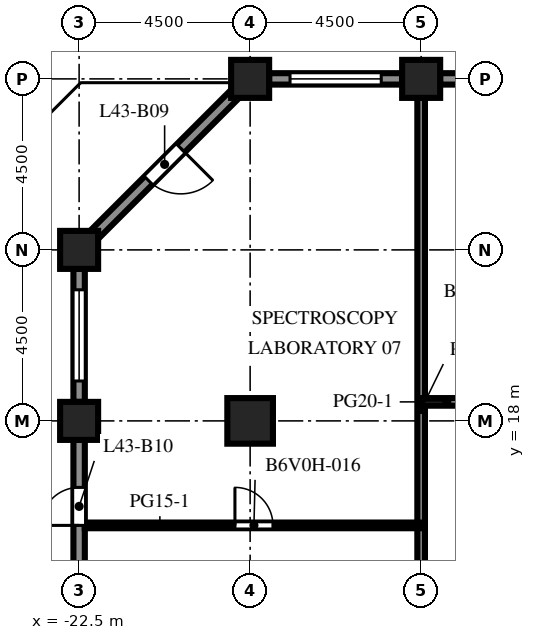
"""IFC4 building model, lengths in metres.
Left out: names, types, materials, properties, quantities, classifications, styles, units other than length and angle.
Written with IfcOpenShell. Run it as: python <this file> out.ifc"""

import sys

from ifc_helpers import new_model, si_unit, direction, frame, frame_2d, origin, origin_2d, place, context, subcontext, project, spatial, rectangle, extrude, element, fill, save


model = new_model("IFC4")
c1 = context("Model", 3, precision=1e-05, world=origin(), true_north=direction((0.0, 1.0)))
c2 = subcontext(c1, "Body", "Model", "MODEL_VIEW")
j1 = project(units=[si_unit("LENGTHUNIT", "METRE"), si_unit("PLANEANGLEUNIT", "RADIAN")], contexts=[c1])
p1 = place(None, origin())
s1 = spatial("IfcSite", under=j1, at=p1, CompositionType="ELEMENT")
p2 = place(p1, origin())
s2 = spatial("IfcBuilding", under=s1, at=p2, CompositionType="ELEMENT")
p3 = place(p2, frame((0.0, 0.0, 191.5)))
s3 = spatial("IfcBuildingStorey", under=s2, at=p3, CompositionType="ELEMENT", Elevation=191.5)
for number, where, z_axis, x_axis in (
    (1, (-22.5, 18.0, -0.45), (0.0, 0.0, 1.0), (1.0, 0.0, 0.0)),
    (2, (-22.5, 22.5, -0.45), (0.0, 0.0, 1.0), (1.0, 0.0, 0.0)),
):
    element("IfcColumn", number, at=place(p3, frame(where, z_axis=z_axis, x_axis=x_axis)), inside=s3, PredefinedType="COLUMN", context=c2, shape_type="SweptSolid", body=[
        extrude(rectangle(XDim=1.0, YDim=1.0, at=origin_2d()), origin(), (0.0, 0.0, 1.0), 4.55),
    ])
for number, where, z_axis, x_axis in (
    (3, (-18.0, 27.0, 0.0), (0.0, 0.0, 1.0), (1.0, 0.0, 0.0)),
    (4, (-13.5, 27.0, 0.0), (0.0, 0.0, 1.0), (1.0, 0.0, 0.0)),
):
    element("IfcColumn", number, at=place(p3, frame(where, z_axis=z_axis, x_axis=x_axis)), inside=s3, PredefinedType="COLUMN", context=c2, shape_type="SweptSolid", body=[
        extrude(rectangle(XDim=1.0, YDim=1.0, at=origin_2d()), origin(), (0.0, 0.0, 1.0), 4.1),
    ])
p4 = place(p3, frame((-18.0, 18.0, -0.45), z_axis=(0.0, 0.0, 1.0), x_axis=(1.0, 0.0, 0.0)))
e5 = element("IfcColumn", 5, at=p4, inside=s3, PredefinedType="COLUMN", context=c2, shape_type="SweptSolid", body=[
    extrude(rectangle(XDim=1.2, YDim=1.2, at=origin_2d()), origin(), (0.0, 0.0, 1.0), 4.55),
])
p5 = place(p3, frame((-13.0, 27.0, 0.0), z_axis=(0.0, 0.0, 1.0), x_axis=(1.0, 0.0, 0.0)))
e6 = element("IfcWall", 6, at=p5, inside=s3, PredefinedType="SOLIDWALL", context=c2, shape_type="SweptSolid", body=[
    extrude(rectangle(XDim=3.5, YDim=0.3, at=frame_2d((1.75, 0.0))), origin(), (0.0, 0.0, 1.0), 2.85),
])
p6 = place(p5, frame((1.25, 0.0, 0.0)))
e7 = element("IfcOpeningElement", 7, at=p6, cuts=e6, PredefinedType="OPENING", context=c2, shape_type="SweptSolid", body=[
    extrude(rectangle(XDim=1.0, YDim=2.2, at=frame_2d((0.5, 1.1))), frame((0.0, 0.16, 0.0), z_axis=(0.0, -1.0, 0.0), x_axis=(1.0, 0.0, 0.0)), (0.0, 0.0, 1.0), 0.32),
])
p7 = place(p3, frame((-17.5, 27.0, 0.0), z_axis=(0.0, 0.0, 1.0), x_axis=(1.0, 0.0, 0.0)))
e8 = element("IfcWall", 8, at=p7, inside=s3, PredefinedType="SOLIDWALL", context=c2, shape_type="SweptSolid", body=[
    extrude(rectangle(XDim=3.5, YDim=0.3, at=frame_2d((1.75, 0.0))), origin(), (0.0, 0.0, 1.0), 2.85),
])
p8 = place(p7, frame((0.55, 0.0, 0.8)))
e9 = element("IfcOpeningElement", 9, at=p8, cuts=e8, PredefinedType="OPENING", context=c2, shape_type="SweptSolid", body=[
    extrude(rectangle(XDim=2.4, YDim=1.7, at=frame_2d((1.2, 0.85))), frame((0.0, 0.16, 0.0), z_axis=(0.0, -1.0, 0.0), x_axis=(1.0, 0.0, 0.0)), (0.0, 0.0, 1.0), 0.32),
])
p9 = place(p3, frame((-22.106, 22.894, 0.0), z_axis=(0.0, 0.0, 1.0), x_axis=(0.707106781187, 0.707106781187, 0.0)))
e10 = element("IfcWall", 10, at=p9, inside=s3, PredefinedType="SOLIDWALL", context=c2, shape_type="SweptSolid", body=[
    extrude(rectangle(XDim=5.25, YDim=0.3, at=frame_2d((2.625, 0.0))), origin(), (0.0, 0.0, 1.0), 2.85),
])
p10 = place(p9, frame((2.025, 0.0, 0.0)))
e11 = element("IfcOpeningElement", 11, at=p10, cuts=e10, PredefinedType="OPENING", context=c2, shape_type="SweptSolid", body=[
    extrude(rectangle(XDim=1.2, YDim=2.2, at=frame_2d((0.6, 1.1))), frame((0.0, 0.16, 0.0), z_axis=(0.0, -1.0, 0.0), x_axis=(1.0, 0.0, 0.0)), (0.0, 0.0, 1.0), 0.32),
])
p11 = place(p3, frame((-22.5, 18.5, 0.0), z_axis=(0.0, 0.0, 1.0), x_axis=(0.0, 1.0, 0.0)))
e12 = element("IfcWall", 12, at=p11, inside=s3, PredefinedType="SOLIDWALL", context=c2, shape_type="SweptSolid", body=[
    extrude(rectangle(XDim=3.5, YDim=0.3, at=frame_2d((1.75, 0.0))), origin(), (0.0, 0.0, 1.0), 2.85),
])
p12 = place(p11, frame((0.55, 0.0, 0.8)))
e13 = element("IfcOpeningElement", 13, at=p12, cuts=e12, PredefinedType="OPENING", context=c2, shape_type="SweptSolid", body=[
    extrude(rectangle(XDim=2.4, YDim=1.7, at=frame_2d((1.2, 0.85))), frame((0.0, 0.16, 0.0), z_axis=(0.0, -1.0, 0.0), x_axis=(1.0, 0.0, 0.0)), (0.0, 0.0, 1.0), 0.32),
])
p13 = place(p3, frame((-22.5, 14.0, 0.0), z_axis=(0.0, 0.0, 1.0), x_axis=(0.0, 1.0, 0.0)))
e14 = element("IfcWall", 14, at=p13, inside=s3, PredefinedType="SOLIDWALL", context=c2, shape_type="SweptSolid", body=[
    extrude(rectangle(XDim=3.5, YDim=0.3, at=frame_2d((1.75, 0.0))), origin(), (0.0, 0.0, 1.0), 2.85),
])
p14 = place(p13, frame((1.25, 0.0, 0.0)))
e15 = element("IfcOpeningElement", 15, at=p14, cuts=e14, PredefinedType="OPENING", context=c2, shape_type="SweptSolid", body=[
    extrude(rectangle(XDim=1.0, YDim=2.2, at=frame_2d((0.5, 1.1))), frame((0.0, 0.16, 0.0), z_axis=(0.0, -1.0, 0.0), x_axis=(1.0, 0.0, 0.0)), (0.0, 0.0, 1.0), 0.32),
])
p15 = place(p3, frame((-13.5, 6.25, 0.0), z_axis=(0.0, 0.0, 1.0), x_axis=(0.0, 1.0, 0.0)))
e16 = element("IfcWall", 16, at=p15, inside=s3, PredefinedType="PARTITIONING", context=c2, shape_type="SweptSolid", body=[
    extrude(rectangle(XDim=20.25, YDim=0.2, at=frame_2d((10.125, 0.0))), origin(), (0.0, 0.0, 1.0), 3.65),
])
p16 = place(p15, frame((2.85, 0.0, 0.0)))
e17 = element("IfcOpeningElement", 17, at=p16, cuts=e16, PredefinedType="OPENING", context=c2, shape_type="SweptSolid", body=[
    extrude(rectangle(XDim=1.0, YDim=2.1, at=frame_2d((0.5, 1.05))), frame((0.0, 0.11, 0.0), z_axis=(0.0, -1.0, 0.0), x_axis=(1.0, 0.0, 0.0)), (0.0, 0.0, 1.0), 0.22),
])
p17 = place(p3, frame((-22.35, 15.25, 0.0), z_axis=(0.0, 0.0, 1.0), x_axis=(1.0, 0.0, 0.0)))
e18 = element("IfcWall", 18, at=p17, inside=s3, PredefinedType="PARTITIONING", context=c2, shape_type="SweptSolid", body=[
    extrude(rectangle(XDim=8.85, YDim=0.15, at=frame_2d((4.425, 0.0))), origin(), (0.0, 0.0, 1.0), 3.65),
])
p18 = place(p17, frame((3.95, 0.0, 0.0)))
e19 = element("IfcOpeningElement", 19, at=p18, cuts=e18, PredefinedType="OPENING", context=c2, shape_type="SweptSolid", body=[
    extrude(rectangle(XDim=1.0, YDim=2.1, at=frame_2d((0.5, 1.05))), frame((0.0, 0.085, 0.0), z_axis=(0.0, -1.0, 0.0), x_axis=(1.0, 0.0, 0.0)), (0.0, 0.0, 1.0), 0.17),
])
p19 = place(p3, frame((-13.5, 18.5, 0.0), z_axis=(0.0, 0.0, 1.0), x_axis=(1.0, 0.0, 0.0)))
e20 = element("IfcWall", 20, at=p19, inside=s3, PredefinedType="PARTITIONING", context=c2, shape_type="SweptSolid", body=[
    extrude(rectangle(XDim=3.0, YDim=0.2, at=frame_2d((1.5, 0.0))), origin(), (0.0, 0.0, 1.0), 3.65),
])
p20 = place(p19, frame((1.35, 0.0, 0.0)))
e21 = element("IfcOpeningElement", 21, at=p20, cuts=e20, PredefinedType="OPENING", context=c2, shape_type="SweptSolid", body=[
    extrude(rectangle(XDim=1.0, YDim=2.1, at=frame_2d((0.5, 1.05))), frame((0.0, 0.11, 0.0), z_axis=(0.0, -1.0, 0.0), x_axis=(1.0, 0.0, 0.0)), (0.0, 0.0, 1.0), 0.22),
])
p21 = place(p8, origin())
e22 = element("IfcWindow", 22, at=p21, inside=s3, PartitioningType="SINGLE_PANEL", PredefinedType="WINDOW", context=c2, shape_type="SweptSolid", body=[
    extrude(rectangle(XDim=2.4, YDim=1.7, at=frame_2d((1.2, 0.85))), frame((0.0, 0.03, 0.0), z_axis=(0.0, -1.0, 0.0), x_axis=(1.0, 0.0, 0.0)), (0.0, 0.0, 1.0), 0.06),
])
fill(e9, e22)
p22 = place(p10, origin())
e23 = element("IfcDoor", 23, at=p22, inside=s3, OperationType="SINGLE_SWING_RIGHT", PredefinedType="DOOR", context=c2, shape_type="SweptSolid", body=[
    extrude(rectangle(XDim=1.2, YDim=2.2, at=frame_2d((0.6, 1.1))), frame((0.0, 0.025, 0.0), z_axis=(0.0, -1.0, 0.0), x_axis=(1.0, 0.0, 0.0)), (0.0, 0.0, 1.0), 0.05),
])
fill(e11, e23)
p23 = place(p12, origin())
e24 = element("IfcWindow", 24, at=p23, inside=s3, PartitioningType="SINGLE_PANEL", PredefinedType="WINDOW", context=c2, shape_type="SweptSolid", body=[
    extrude(rectangle(XDim=2.4, YDim=1.7, at=frame_2d((1.2, 0.85))), frame((0.0, 0.03, 0.0), z_axis=(0.0, -1.0, 0.0), x_axis=(1.0, 0.0, 0.0)), (0.0, 0.0, 1.0), 0.06),
])
fill(e13, e24)
p24 = place(p14, origin())
e25 = element("IfcDoor", 25, at=p24, inside=s3, OperationType="SINGLE_SWING_LEFT", PredefinedType="DOOR", context=c2, shape_type="SweptSolid", body=[
    extrude(rectangle(XDim=1.0, YDim=2.2, at=frame_2d((0.5, 1.1))), frame((0.0, 0.025, 0.0), z_axis=(0.0, -1.0, 0.0), x_axis=(1.0, 0.0, 0.0)), (0.0, 0.0, 1.0), 0.05),
])
fill(e15, e25)
p25 = place(p18, origin())
e26 = element("IfcDoor", 26, at=p25, inside=s3, OperationType="SINGLE_SWING_LEFT", PredefinedType="DOOR", context=c2, shape_type="SweptSolid", body=[
    extrude(rectangle(XDim=1.0, YDim=2.1, at=frame_2d((0.5, 1.05))), frame((0.0, 0.025, 0.0), z_axis=(0.0, -1.0, 0.0), x_axis=(1.0, 0.0, 0.0)), (0.0, 0.0, 1.0), 0.05),
])
fill(e19, e26)
save(model, sys.argv[1])
